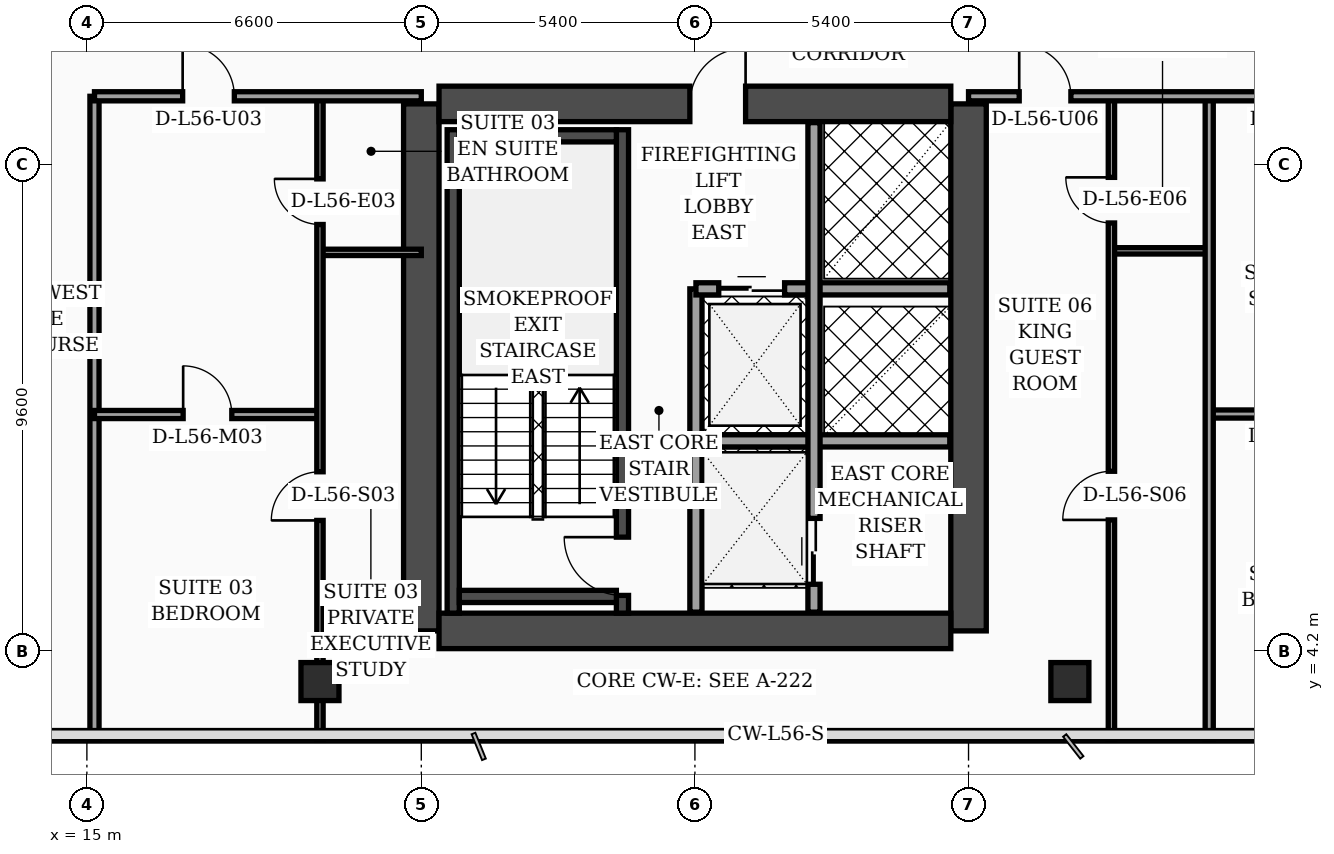
"""IFC4 building model, lengths in metres.
Left out: names, types, materials, properties, quantities, classifications, styles, units other than length and angle.
Written with IfcOpenShell. Run it as: python <this file> out.ifc"""

import sys

from ifc_helpers import new_model, si_unit, direction, frame, frame_2d, origin, origin_2d, place, context, subcontext, project, spatial, rectangle, hollow_rectangle, extrude, element, fill, save


model = new_model("IFC4")
c1 = context("Model", 3, precision=1e-05, world=origin(), true_north=direction((0.0, 1.0)))
c2 = subcontext(c1, "Body", "Model", "MODEL_VIEW")
j1 = project(units=[si_unit("LENGTHUNIT", "METRE"), si_unit("PLANEANGLEUNIT", "RADIAN")], contexts=[c1])
p1 = place(None, origin())
s1 = spatial("IfcSite", under=j1, at=p1, CompositionType="ELEMENT")
p2 = place(p1, origin())
s2 = spatial("IfcBuilding", under=s1, at=p2, CompositionType="ELEMENT")
p3 = place(p2, frame((0.0, 0.0, 226.9)))
s3 = spatial("IfcBuildingStorey", under=s2, at=p3, CompositionType="ELEMENT", Elevation=226.9)
for number, where, z_axis, x_axis in (
    (1, (21.6, 4.6, 0.0), (0.0, 0.0, 1.0), (0.0, 1.0, 0.0)),
    (2, (32.4, 4.6, 0.0), (0.0, 0.0, 1.0), (0.0, 1.0, 0.0)),
):
    element("IfcWall", number, at=place(p3, frame(where, z_axis=z_axis, x_axis=x_axis)), inside=s3, PredefinedType="SHEAR", context=c2, shape_type="SweptSolid", body=[
        extrude(rectangle(XDim=10.4, YDim=0.7, at=frame_2d((5.2, 0.0))), origin(), (0.0, 0.0, 1.0), 3.56),
    ])
p4 = place(p3, frame((21.95, 15.0, 0.0), z_axis=(0.0, 0.0, 1.0), x_axis=(1.0, 0.0, 0.0)))
e3 = element("IfcWall", 3, at=p4, inside=s3, PredefinedType="SHEAR", context=c2, shape_type="SweptSolid", body=[
    extrude(rectangle(XDim=10.1, YDim=0.7, at=frame_2d((5.05, 0.0))), origin(), (0.0, 0.0, 1.0), 3.56),
])
p5 = place(p4, frame((4.95, 0.0, 0.0)))
e4 = element("IfcOpeningElement", 4, at=p5, cuts=e3, PredefinedType="OPENING", context=c2, shape_type="SweptSolid", body=[
    extrude(rectangle(XDim=1.1, YDim=2.2, at=frame_2d((0.55, 1.1))), frame((0.0, 0.36, 0.0), z_axis=(0.0, -1.0, 0.0), x_axis=(1.0, 0.0, 0.0)), (0.0, 0.0, 1.0), 0.72),
])
p6 = place(p3, frame((21.95, 4.6, 0.0), z_axis=(0.0, 0.0, 1.0), x_axis=(1.0, 0.0, 0.0)))
e5 = element("IfcWall", 5, at=p6, inside=s3, PredefinedType="SHEAR", context=c2, shape_type="SweptSolid", body=[
    extrude(rectangle(XDim=10.1, YDim=0.7, at=frame_2d((5.05, 0.0))), origin(), (0.0, 0.0, 1.0), 3.56),
])
p7 = place(p3, frame((22.23, 4.95, 0.0), z_axis=(0.0, 0.0, 1.0), x_axis=(0.0, 1.0, 0.0)))
e6 = element("IfcWall", 6, at=p7, inside=s3, PredefinedType="SOLIDWALL", context=c2, shape_type="SweptSolid", body=[
    extrude(rectangle(XDim=9.54, YDim=0.24, at=frame_2d((4.77, 0.0))), origin(), (0.0, 0.0, 1.0), 3.56),
])
p8 = place(p3, frame((25.57, 4.95, 0.0), z_axis=(0.0, 0.0, 1.0), x_axis=(0.0, 1.0, 0.0)))
e7 = element("IfcWall", 7, at=p8, inside=s3, PredefinedType="SOLIDWALL", context=c2, shape_type="SweptSolid", body=[
    extrude(rectangle(XDim=9.54, YDim=0.24, at=frame_2d((4.77, 0.0))), origin(), (0.0, 0.0, 1.0), 3.56),
])
p9 = place(p8, frame((0.35, 0.0, 0.0)))
e8 = element("IfcOpeningElement", 8, at=p9, cuts=e7, PredefinedType="OPENING", context=c2, shape_type="SweptSolid", body=[
    extrude(rectangle(XDim=1.15, YDim=2.2, at=frame_2d((0.575, 1.1))), frame((0.0, 0.13, 0.0), z_axis=(0.0, -1.0, 0.0), x_axis=(1.0, 0.0, 0.0)), (0.0, 0.0, 1.0), 0.26),
])
for number, where, z_axis, x_axis in (
    (9, (22.35, 5.28, 0.0), (0.0, 0.0, 1.0), (1.0, 0.0, 0.0)),
    (10, (22.35, 14.37, 0.0), (0.0, 0.0, 1.0), (1.0, 0.0, 0.0)),
):
    element("IfcWall", number, at=place(p3, frame(where, z_axis=z_axis, x_axis=x_axis)), inside=s3, PredefinedType="SOLIDWALL", context=c2, shape_type="SweptSolid", body=[
        extrude(rectangle(XDim=3.1, YDim=0.24, at=frame_2d((1.55, 0.0))), origin(), (0.0, 0.0, 1.0), 3.56),
    ])
for number, where, z_axis, x_axis in (
    (11, (19.6, 3.6, 0.0), (0.0, 0.0, 1.0), (1.0, 0.0, 0.0)),
    (12, (34.4, 3.6, 0.0), (0.0, 0.0, 1.0), (1.0, 0.0, 0.0)),
):
    element("IfcColumn", number, at=place(p3, frame(where, z_axis=z_axis, x_axis=x_axis)), inside=s3, PredefinedType="COLUMN", context=c2, shape_type="SweptSolid", body=[
        extrude(hollow_rectangle(XDim=0.75, YDim=0.75, WallThickness=0.032, at=origin_2d()), origin(), (0.0, 0.0, 1.0), 3.56),
    ])
p10 = place(p3, frame((27.02, 4.97, 0.0), z_axis=(0.0, 0.0, 1.0), x_axis=(0.0, 1.0, 0.0)))
e13 = element("IfcWall", 13, at=p10, inside=s3, PredefinedType="SOLIDWALL", context=c2, shape_type="SweptSolid", body=[
    extrude(rectangle(XDim=6.38, YDim=0.24, at=frame_2d((3.19, 0.0))), origin(), (0.0, 0.0, 1.0), 3.56),
])
p11 = place(p3, frame((27.02, 11.35, 0.0), z_axis=(0.0, 0.0, 1.0), x_axis=(1.0, 0.0, 0.0)))
e14 = element("IfcWall", 14, at=p11, inside=s3, PredefinedType="SOLIDWALL", context=c2, shape_type="SweptSolid", body=[
    extrude(rectangle(XDim=5.01, YDim=0.24, at=frame_2d((2.505, 0.0))), origin(), (0.0, 0.0, 1.0), 3.56),
])
p12 = place(p11, frame((0.45, 0.0, 0.0)))
e15 = element("IfcOpeningElement", 15, at=p12, cuts=e14, PredefinedType="OPENING", context=c2, shape_type="SweptSolid", body=[
    extrude(rectangle(XDim=1.3, YDim=2.35, at=frame_2d((0.65, 1.175))), frame((0.0, 0.13, 0.0), z_axis=(0.0, -1.0, 0.0), x_axis=(1.0, 0.0, 0.0)), (0.0, 0.0, 1.0), 0.26),
])
p13 = place(p3, frame((27.02, 8.35, 0.0), z_axis=(0.0, 0.0, 1.0), x_axis=(1.0, 0.0, 0.0)))
e16 = element("IfcWall", 16, at=p13, inside=s3, PredefinedType="SOLIDWALL", context=c2, shape_type="SweptSolid", body=[
    extrude(rectangle(XDim=5.01, YDim=0.24, at=frame_2d((2.505, 0.0))), origin(), (0.0, 0.0, 1.0), 3.56),
])
p14 = place(p3, frame((29.35, 4.97, 0.0), z_axis=(0.0, 0.0, 1.0), x_axis=(0.0, 1.0, 0.0)))
e17 = element("IfcWall", 17, at=p14, inside=s3, PredefinedType="SOLIDWALL", context=c2, shape_type="SweptSolid", body=[
    extrude(rectangle(XDim=9.66, YDim=0.24, at=frame_2d((4.83, 0.0))), origin(), (0.0, 0.0, 1.0), 3.56),
])
p15 = place(p14, frame((0.55, 0.0, 0.0)))
e18 = element("IfcOpeningElement", 18, at=p15, cuts=e17, PredefinedType="OPENING", context=c2, shape_type="SweptSolid", body=[
    extrude(rectangle(XDim=1.3, YDim=2.35, at=frame_2d((0.65, 1.175))), frame((0.0, 0.13, 0.0), z_axis=(0.0, -1.0, 0.0), x_axis=(1.0, 0.0, 0.0)), (0.0, 0.0, 1.0), 0.26),
])
p16 = place(p3, frame((15.15, 2.44, 0.0), z_axis=(0.0, 0.0, 1.0), x_axis=(0.0, 1.0, 0.0)))
e19 = element("IfcWall", 19, at=p16, inside=s3, PredefinedType="PARTITIONING", context=c2, shape_type="SweptSolid", body=[
    extrude(rectangle(XDim=12.71, YDim=0.18, at=frame_2d((6.355, 0.0))), origin(), (0.0, 0.0, 1.0), 3.09),
])
p17 = place(p3, frame((19.6, 12.07, 0.0), z_axis=(0.0, 0.0, 1.0), x_axis=(1.0, 0.0, 0.0)))
e20 = element("IfcWall", 20, at=p17, inside=s3, PredefinedType="PARTITIONING", context=c2, shape_type="SweptSolid", body=[
    extrude(rectangle(XDim=2.0, YDim=0.125, at=frame_2d((1.0, 0.0))), origin(), (0.0, 0.0, 1.0), 3.56),
])
p18 = place(p3, frame((15.15, 8.87, 0.0), z_axis=(0.0, 0.0, 1.0), x_axis=(1.0, 0.0, 0.0)))
e21 = element("IfcWall", 21, at=p18, inside=s3, PredefinedType="PARTITIONING", context=c2, shape_type="SweptSolid", body=[
    extrude(rectangle(XDim=4.45, YDim=0.16, at=frame_2d((2.225, 0.0))), origin(), (0.0, 0.0, 1.0), 3.56),
])
p19 = place(p18, frame((1.75, 0.0, 0.0)))
e22 = element("IfcOpeningElement", 22, at=p19, cuts=e21, PredefinedType="OPENING", context=c2, shape_type="SweptSolid", body=[
    extrude(rectangle(XDim=0.96, YDim=2.2, at=frame_2d((0.48, 1.1))), frame((0.0, 0.09, 0.0), z_axis=(0.0, -1.0, 0.0), x_axis=(1.0, 0.0, 0.0)), (0.0, 0.0, 1.0), 0.18),
])
p20 = place(p3, frame((19.6, 2.44, 0.0), z_axis=(0.0, 0.0, 1.0), x_axis=(0.0, 1.0, 0.0)))
e23 = element("IfcWall", 23, at=p20, inside=s3, PredefinedType="PARTITIONING", context=c2, shape_type="SweptSolid", body=[
    extrude(rectangle(XDim=12.71, YDim=0.125, at=frame_2d((6.355, 0.0))), origin(), (0.0, 0.0, 1.0), 2.59),
])
p21 = place(p20, frame((4.34, 0.0, 0.0)))
e24 = element("IfcOpeningElement", 24, at=p21, cuts=e23, PredefinedType="OPENING", context=c2, shape_type="SweptSolid", body=[
    extrude(rectangle(XDim=0.96, YDim=2.2, at=frame_2d((0.48, 1.1))), frame((0.0, 0.073, 0.0), z_axis=(0.0, -1.0, 0.0), x_axis=(1.0, 0.0, 0.0)), (0.0, 0.0, 1.0), 0.145),
])
p22 = place(p20, frame((10.18, 0.0, 0.0)))
e25 = element("IfcOpeningElement", 25, at=p22, cuts=e23, PredefinedType="OPENING", context=c2, shape_type="SweptSolid", body=[
    extrude(rectangle(XDim=0.9, YDim=2.15, at=frame_2d((0.45, 1.075))), frame((0.0, 0.073, 0.0), z_axis=(0.0, -1.0, 0.0), x_axis=(1.0, 0.0, 0.0)), (0.0, 0.0, 1.0), 0.145),
])
p23 = place(p3, frame((15.15, 15.15, 0.0), z_axis=(0.0, 0.0, 1.0), x_axis=(1.0, 0.0, 0.0)))
e26 = element("IfcWall", 26, at=p23, inside=s3, PredefinedType="PARTITIONING", context=c2, shape_type="SweptSolid", body=[
    extrude(rectangle(XDim=6.45, YDim=0.18, at=frame_2d((3.225, 0.0))), origin(), (0.0, 0.0, 1.0), 2.59),
])
p24 = place(p23, frame((1.74, 0.0, 0.0)))
e27 = element("IfcOpeningElement", 27, at=p24, cuts=e26, PredefinedType="OPENING", context=c2, shape_type="SweptSolid", body=[
    extrude(rectangle(XDim=1.02, YDim=2.2, at=frame_2d((0.51, 1.1))), frame((0.0, 0.1, 0.0), z_axis=(0.0, -1.0, 0.0), x_axis=(1.0, 0.0, 0.0)), (0.0, 0.0, 1.0), 0.2),
])
p25 = place(p3, frame((35.22, 12.1, 0.0), z_axis=(0.0, 0.0, 1.0), x_axis=(1.0, 0.0, 0.0)))
e28 = element("IfcWall", 28, at=p25, inside=s3, PredefinedType="PARTITIONING", context=c2, shape_type="SweptSolid", body=[
    extrude(rectangle(XDim=1.93, YDim=0.125, at=frame_2d((0.965, 0.0))), origin(), (0.0, 0.0, 1.0), 3.56),
])
p26 = place(p3, frame((35.22, 2.44, 0.0), z_axis=(0.0, 0.0, 1.0), x_axis=(0.0, 1.0, 0.0)))
e29 = element("IfcWall", 29, at=p26, inside=s3, PredefinedType="PARTITIONING", context=c2, shape_type="SweptSolid", body=[
    extrude(rectangle(XDim=12.71, YDim=0.125, at=frame_2d((6.355, 0.0))), origin(), (0.0, 0.0, 1.0), 2.94),
])
p27 = place(p26, frame((4.35, 0.0, 0.0)))
e30 = element("IfcOpeningElement", 30, at=p27, cuts=e29, PredefinedType="OPENING", context=c2, shape_type="SweptSolid", body=[
    extrude(rectangle(XDim=0.96, YDim=2.2, at=frame_2d((0.48, 1.1))), frame((0.0, 0.073, 0.0), z_axis=(0.0, -1.0, 0.0), x_axis=(1.0, 0.0, 0.0)), (0.0, 0.0, 1.0), 0.145),
])
p28 = place(p26, frame((10.21, 0.0, 0.0)))
e31 = element("IfcOpeningElement", 31, at=p28, cuts=e29, PredefinedType="OPENING", context=c2, shape_type="SweptSolid", body=[
    extrude(rectangle(XDim=0.9, YDim=2.15, at=frame_2d((0.45, 1.075))), frame((0.0, 0.073, 0.0), z_axis=(0.0, -1.0, 0.0), x_axis=(1.0, 0.0, 0.0)), (0.0, 0.0, 1.0), 0.145),
])
p29 = place(p3, frame((37.15, 8.88, 0.0), z_axis=(0.0, 0.0, 1.0), x_axis=(1.0, 0.0, 0.0)))
e32 = element("IfcWall", 32, at=p29, inside=s3, PredefinedType="PARTITIONING", context=c2, shape_type="SweptSolid", body=[
    extrude(rectangle(XDim=3.72, YDim=0.16, at=frame_2d((1.86, 0.0))), origin(), (0.0, 0.0, 1.0), 2.94),
])
p30 = place(p29, frame((1.38, 0.0, 0.0)))
e33 = element("IfcOpeningElement", 33, at=p30, cuts=e32, PredefinedType="OPENING", context=c2, shape_type="SweptSolid", body=[
    extrude(rectangle(XDim=0.96, YDim=2.2, at=frame_2d((0.48, 1.1))), frame((0.0, 0.09, 0.0), z_axis=(0.0, -1.0, 0.0), x_axis=(1.0, 0.0, 0.0)), (0.0, 0.0, 1.0), 0.18),
])
p31 = place(p3, frame((37.15, 2.44, 0.0), z_axis=(0.0, 0.0, 1.0), x_axis=(0.0, 1.0, 0.0)))
e34 = element("IfcWall", 34, at=p31, inside=s3, PredefinedType="PARTITIONING", context=c2, shape_type="SweptSolid", body=[
    extrude(rectangle(XDim=12.71, YDim=0.16, at=frame_2d((6.355, 0.0))), origin(), (0.0, 0.0, 1.0), 2.94),
])
p32 = place(p3, frame((32.4, 15.15, 0.0), z_axis=(0.0, 0.0, 1.0), x_axis=(1.0, 0.0, 0.0)))
e35 = element("IfcWall", 35, at=p32, inside=s3, PredefinedType="PARTITIONING", context=c2, shape_type="SweptSolid", body=[
    extrude(rectangle(XDim=10.4, YDim=0.18, at=frame_2d((5.2, 0.0))), origin(), (0.0, 0.0, 1.0), 2.94),
])
p33 = place(p32, frame((1.0, 0.0, 0.0)))
e36 = element("IfcOpeningElement", 36, at=p33, cuts=e35, PredefinedType="OPENING", context=c2, shape_type="SweptSolid", body=[
    extrude(rectangle(XDim=1.02, YDim=2.2, at=frame_2d((0.51, 1.1))), frame((0.0, 0.1, 0.0), z_axis=(0.0, -1.0, 0.0), x_axis=(1.0, 0.0, 0.0)), (0.0, 0.0, 1.0), 0.2),
])
p34 = place(p32, frame((6.1, 0.0, 0.0)))
e37 = element("IfcOpeningElement", 37, at=p34, cuts=e35, PredefinedType="OPENING", context=c2, shape_type="SweptSolid", body=[
    extrude(rectangle(XDim=1.02, YDim=2.2, at=frame_2d((0.51, 1.1))), frame((0.0, 0.1, 0.0), z_axis=(0.0, -1.0, 0.0), x_axis=(1.0, 0.0, 0.0)), (0.0, 0.0, 1.0), 0.2),
])
p35 = place(p12, origin())
e38 = element("IfcDoor", 38, at=p35, inside=s3, OperationType="DOUBLE_DOOR_SLIDING", PredefinedType="DOOR", context=c2, shape_type="SweptSolid", body=[
    extrude(rectangle(XDim=1.3, YDim=2.35, at=frame_2d((0.65, 1.175))), frame((0.0, 0.025, 0.0), z_axis=(0.0, -1.0, 0.0), x_axis=(1.0, 0.0, 0.0)), (0.0, 0.0, 1.0), 0.05),
])
fill(e15, e38)
p36 = place(p15, origin())
e39 = element("IfcDoor", 39, at=p36, inside=s3, OperationType="DOUBLE_DOOR_SLIDING", PredefinedType="DOOR", context=c2, shape_type="SweptSolid", body=[
    extrude(rectangle(XDim=1.3, YDim=2.35, at=frame_2d((0.65, 1.175))), frame((0.0, 0.025, 0.0), z_axis=(0.0, -1.0, 0.0), x_axis=(1.0, 0.0, 0.0)), (0.0, 0.0, 1.0), 0.05),
])
fill(e18, e39)
p37 = place(p19, origin())
e40 = element("IfcDoor", 40, at=p37, inside=s3, OperationType="SINGLE_SWING_LEFT", PredefinedType="DOOR", context=c2, shape_type="SweptSolid", body=[
    extrude(rectangle(XDim=0.96, YDim=2.2, at=frame_2d((0.48, 1.1))), frame((0.0, 0.025, 0.0), z_axis=(0.0, -1.0, 0.0), x_axis=(1.0, 0.0, 0.0)), (0.0, 0.0, 1.0), 0.05),
])
fill(e22, e40)
p38 = place(p21, origin())
e41 = element("IfcDoor", 41, at=p38, inside=s3, OperationType="SINGLE_SWING_LEFT", PredefinedType="DOOR", context=c2, shape_type="SweptSolid", body=[
    extrude(rectangle(XDim=0.96, YDim=2.2, at=frame_2d((0.48, 1.1))), frame((0.0, 0.025, 0.0), z_axis=(0.0, -1.0, 0.0), x_axis=(1.0, 0.0, 0.0)), (0.0, 0.0, 1.0), 0.05),
])
fill(e24, e41)
p39 = place(p22, origin())
e42 = element("IfcDoor", 42, at=p39, inside=s3, OperationType="SINGLE_SWING_RIGHT", PredefinedType="DOOR", context=c2, shape_type="SweptSolid", body=[
    extrude(rectangle(XDim=0.9, YDim=2.15, at=frame_2d((0.45, 1.075))), frame((0.0, 0.025, 0.0), z_axis=(0.0, -1.0, 0.0), x_axis=(1.0, 0.0, 0.0)), (0.0, 0.0, 1.0), 0.05),
])
fill(e25, e42)
p40 = place(p24, origin())
e43 = element("IfcDoor", 43, at=p40, inside=s3, OperationType="SINGLE_SWING_LEFT", PredefinedType="DOOR", context=c2, shape_type="SweptSolid", body=[
    extrude(rectangle(XDim=1.02, YDim=2.2, at=frame_2d((0.51, 1.1))), frame((0.0, 0.025, 0.0), z_axis=(0.0, -1.0, 0.0), x_axis=(1.0, 0.0, 0.0)), (0.0, 0.0, 1.0), 0.05),
])
fill(e27, e43)
p41 = place(p27, origin())
e44 = element("IfcDoor", 44, at=p41, inside=s3, OperationType="SINGLE_SWING_LEFT", PredefinedType="DOOR", context=c2, shape_type="SweptSolid", body=[
    extrude(rectangle(XDim=0.96, YDim=2.2, at=frame_2d((0.48, 1.1))), frame((0.0, 0.025, 0.0), z_axis=(0.0, -1.0, 0.0), x_axis=(1.0, 0.0, 0.0)), (0.0, 0.0, 1.0), 0.05),
])
fill(e30, e44)
p42 = place(p28, origin())
e45 = element("IfcDoor", 45, at=p42, inside=s3, OperationType="SINGLE_SWING_RIGHT", PredefinedType="DOOR", context=c2, shape_type="SweptSolid", body=[
    extrude(rectangle(XDim=0.9, YDim=2.15, at=frame_2d((0.45, 1.075))), frame((0.0, 0.025, 0.0), z_axis=(0.0, -1.0, 0.0), x_axis=(1.0, 0.0, 0.0)), (0.0, 0.0, 1.0), 0.05),
])
fill(e31, e45)
p43 = place(p33, origin())
e46 = element("IfcDoor", 46, at=p43, inside=s3, OperationType="SINGLE_SWING_LEFT", PredefinedType="DOOR", context=c2, shape_type="SweptSolid", body=[
    extrude(rectangle(XDim=1.02, YDim=2.2, at=frame_2d((0.51, 1.1))), frame((0.0, 0.025, 0.0), z_axis=(0.0, -1.0, 0.0), x_axis=(1.0, 0.0, 0.0)), (0.0, 0.0, 1.0), 0.05),
])
fill(e36, e46)
p44 = place(p9, origin())
e47 = element("IfcDoor", 47, at=p44, inside=s3, OperationType="SINGLE_SWING_RIGHT", PredefinedType="DOOR", context=c2, shape_type="SweptSolid", body=[
    extrude(rectangle(XDim=1.15, YDim=2.2, at=frame_2d((0.575, 1.1))), frame((0.0, 0.025, 0.0), z_axis=(0.0, -1.0, 0.0), x_axis=(1.0, 0.0, 0.0)), (0.0, 0.0, 1.0), 0.05),
])
fill(e8, e47)
p45 = place(p5, origin())
e48 = element("IfcDoor", 48, at=p45, inside=s3, OperationType="SINGLE_SWING_RIGHT", PredefinedType="DOOR", context=c2, shape_type="SweptSolid", body=[
    extrude(rectangle(XDim=1.1, YDim=2.2, at=frame_2d((0.55, 1.1))), frame((0.0, 0.025, 0.0), z_axis=(0.0, -1.0, 0.0), x_axis=(1.0, 0.0, 0.0)), (0.0, 0.0, 1.0), 0.05),
])
fill(e4, e48)
save(model, sys.argv[1])
